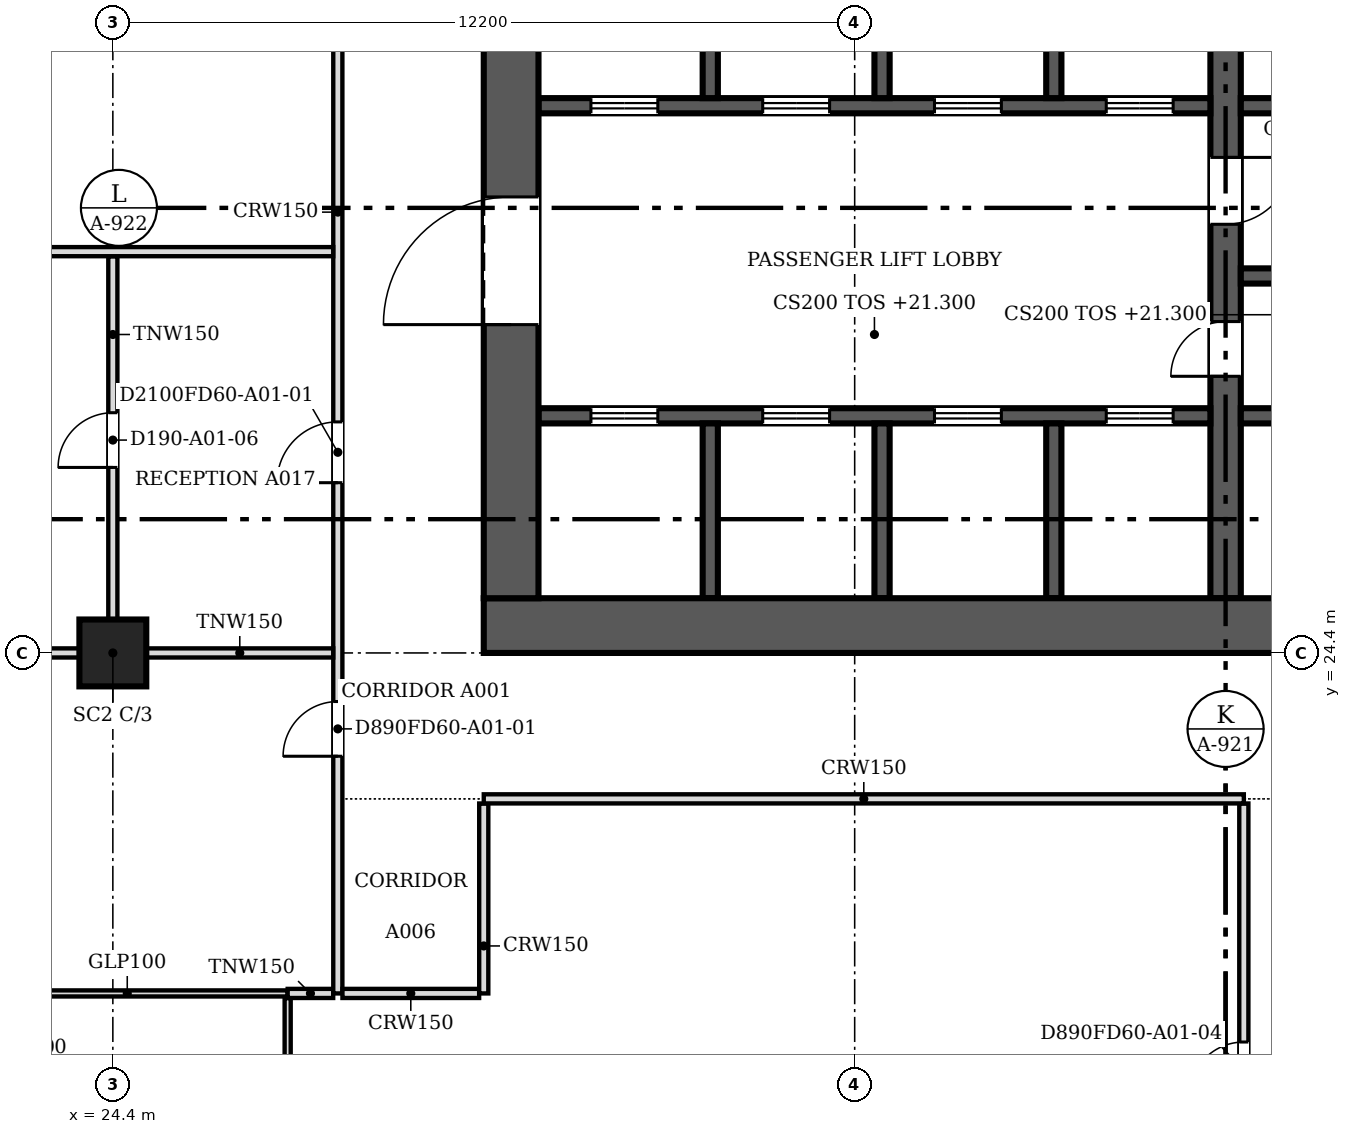
"""IFC4 building model, lengths in metres.
Left out: names, types, materials, properties, quantities, classifications, styles, units other than length and angle.
Written with IfcOpenShell. Run it as: python <this file> out.ifc"""

import sys

from ifc_helpers import new_model, si_unit, direction, frame, frame_2d, origin, origin_2d, place, context, subcontext, project, spatial, rectangle, extrude, source, transform, mapped, element, fill, save


model = new_model("IFC4")
c1 = context("Model", 3, precision=1e-05, world=origin(), true_north=direction((0.0, 1.0)))
c2 = subcontext(c1, "Body", "Model", "MODEL_VIEW")
j1 = project(units=[si_unit("LENGTHUNIT", "METRE"), si_unit("PLANEANGLEUNIT", "RADIAN")], contexts=[c1])
p1 = place(None, origin())
s1 = spatial("IfcSite", under=j1, at=p1, CompositionType="ELEMENT")
p2 = place(p1, origin())
s2 = spatial("IfcBuilding", under=s1, at=p2, CompositionType="ELEMENT")
p3 = place(p2, frame((0.0, 0.0, 21.3)))
s3 = spatial("IfcBuildingStorey", under=s2, at=p3, CompositionType="ELEMENT", Elevation=21.3)
p4 = place(p3, frame((24.4, 24.4, 0.0), z_axis=(0.0, 0.0, 1.0), x_axis=(1.0, 0.0, 0.0)))
e1 = element("IfcColumn", 1, at=p4, inside=s3, PredefinedType="COLUMN", context=c2, shape_type="SweptSolid", body=[
    extrude(rectangle(XDim=1.1, YDim=1.1, at=origin_2d()), origin(), (0.0, 0.0, 1.0), 4.3),
])
p5 = place(p3, frame((54.9, 24.85, 0.0), z_axis=(0.0, 0.0, 1.0), x_axis=(-1.0, 0.0, 0.0)))
e2 = element("IfcWall", 2, at=p5, inside=s3, PredefinedType="SHEAR", context=c2, shape_type="SweptSolid", body=[
    extrude(rectangle(XDim=24.4, YDim=0.9, at=frame_2d((12.2, 0.0))), origin(), (0.0, 0.0, 1.0), 4.5),
])
m1 = source(origin(), c2, "Body", "SweptSolid", [
    extrude(rectangle(XDim=1.2, YDim=2.1, at=frame_2d((0.6, 1.05))), frame((0.0, 0.46, 0.0), z_axis=(0.0, -1.0, 0.0), x_axis=(1.0, 0.0, 0.0)), (0.0, 0.0, 1.0), 0.92),
])
p6 = place(p5, frame((1.5, 0.0, 0.0)))
e3 = element("IfcOpeningElement", 3, at=p6, cuts=e2, PredefinedType="OPENING", context=c2, shape_type="MappedRepresentation", body=[
    mapped(m1, transform((0.0, 0.0, 0.0), scale=1.0)),
])
p7 = place(p3, frame((30.95, 25.3, 0.0), z_axis=(0.0, 0.0, 1.0), x_axis=(0.0, 1.0, 0.0)))
e4 = element("IfcWall", 4, at=p7, inside=s3, PredefinedType="SHEAR", context=c2, shape_type="SweptSolid", body=[
    extrude(rectangle(XDim=22.6, YDim=0.9, at=frame_2d((11.3, 0.0))), origin(), (0.0, 0.0, 1.0), 4.5),
])
m2 = source(origin(), c2, "Body", "SweptSolid", [
    extrude(rectangle(XDim=2.1, YDim=2.4, at=frame_2d((1.05, 1.2))), frame((0.0, 0.46, 0.0), z_axis=(0.0, -1.0, 0.0), x_axis=(1.0, 0.0, 0.0)), (0.0, 0.0, 1.0), 0.92),
])
p8 = place(p7, frame((4.5, 0.0, 0.0)))
e5 = element("IfcOpeningElement", 5, at=p8, cuts=e4, PredefinedType="OPENING", context=c2, shape_type="MappedRepresentation", body=[
    mapped(m2, transform((0.0, 0.0, 0.0), scale=1.0)),
])
p9 = place(p7, frame((16.0, 0.0, 0.0)))
e6 = element("IfcOpeningElement", 6, at=p9, cuts=e4, PredefinedType="OPENING", context=c2, shape_type="MappedRepresentation", body=[
    mapped(m2, transform((0.0, 0.0, 0.0), scale=1.0)),
])
p10 = place(p3, frame((42.7, 36.35, 0.0), z_axis=(0.0, 0.0, 1.0), x_axis=(0.0, -1.0, 0.0)))
e7 = element("IfcWall", 7, at=p10, inside=s3, PredefinedType="SHEAR", context=c2, shape_type="SweptSolid", body=[
    extrude(rectangle(XDim=11.05, YDim=0.5, at=frame_2d((5.525, 0.0))), origin(), (0.0, 0.0, 1.0), 4.5),
])
m3 = source(origin(), c2, "Body", "SweptSolid", [
    extrude(rectangle(XDim=0.9, YDim=2.1, at=frame_2d((0.45, 1.05))), frame((0.0, 0.26, 0.0), z_axis=(0.0, -1.0, 0.0), x_axis=(1.0, 0.0, 0.0)), (0.0, 0.0, 1.0), 0.52),
])
p11 = place(p10, frame((6.5, 0.0, 0.0)))
e8 = element("IfcOpeningElement", 8, at=p11, cuts=e7, PredefinedType="OPENING", context=c2, shape_type="MappedRepresentation", body=[
    mapped(m3, transform((0.0, 0.0, 0.0), scale=1.0)),
])
m4 = source(origin(), c2, "Body", "SweptSolid", [
    extrude(rectangle(XDim=1.1, YDim=2.1, at=frame_2d((0.55, 1.05))), frame((0.0, 0.26, 0.0), z_axis=(0.0, -1.0, 0.0), x_axis=(1.0, 0.0, 0.0)), (0.0, 0.0, 1.0), 0.52),
])
p12 = place(p10, frame((3.8, 0.0, 0.0)))
e9 = element("IfcOpeningElement", 9, at=p12, cuts=e7, PredefinedType="OPENING", context=c2, shape_type="MappedRepresentation", body=[
    mapped(m4, transform((0.0, 0.0, 0.0), scale=1.0)),
])
p13 = place(p3, frame((42.45, 33.4, 0.0), z_axis=(0.0, 0.0, 1.0), x_axis=(-1.0, 0.0, 0.0)))
e10 = element("IfcWall", 10, at=p13, inside=s3, PredefinedType="SOLIDWALL", context=c2, shape_type="SweptSolid", body=[
    extrude(rectangle(XDim=11.05, YDim=0.25, at=frame_2d((5.525, 0.0))), origin(), (0.0, 0.0, 1.0), 4.5),
])
m5 = source(origin(), c2, "Body", "SweptSolid", [
    extrude(rectangle(XDim=1.1, YDim=2.1, at=frame_2d((0.55, 1.05))), frame((0.0, 0.135, 0.0), z_axis=(0.0, -1.0, 0.0), x_axis=(1.0, 0.0, 0.0)), (0.0, 0.0, 1.0), 0.27),
])
p14 = place(p13, frame((9.087, 0.0, 0.0)))
e11 = element("IfcOpeningElement", 11, at=p14, cuts=e10, PredefinedType="OPENING", context=c2, shape_type="MappedRepresentation", body=[
    mapped(m5, transform((0.0, 0.0, 0.0), scale=1.0)),
])
p15 = place(p13, frame((6.262, 0.0, 0.0)))
e12 = element("IfcOpeningElement", 12, at=p15, cuts=e10, PredefinedType="OPENING", context=c2, shape_type="MappedRepresentation", body=[
    mapped(m5, transform((0.0, 0.0, 0.0), scale=1.0)),
])
p16 = place(p13, frame((3.438, 0.0, 0.0)))
e13 = element("IfcOpeningElement", 13, at=p16, cuts=e10, PredefinedType="OPENING", context=c2, shape_type="MappedRepresentation", body=[
    mapped(m5, transform((0.0, 0.0, 0.0), scale=1.0)),
])
p17 = place(p13, frame((0.613, 0.0, 0.0)))
e14 = element("IfcOpeningElement", 14, at=p17, cuts=e10, PredefinedType="OPENING", context=c2, shape_type="MappedRepresentation", body=[
    mapped(m5, transform((0.0, 0.0, 0.0), scale=1.0)),
])
p18 = place(p3, frame((48.225, 33.4, 0.0), z_axis=(0.0, 0.0, 1.0), x_axis=(-1.0, 0.0, 0.0)))
e15 = element("IfcWall", 15, at=p18, inside=s3, PredefinedType="SOLIDWALL", context=c2, shape_type="SweptSolid", body=[
    extrude(rectangle(XDim=5.275, YDim=0.25, at=frame_2d((2.638, 0.0))), origin(), (0.0, 0.0, 1.0), 4.5),
])
m6 = source(origin(), c2, "Body", "SweptSolid", [
    extrude(rectangle(XDim=1.2, YDim=2.1, at=frame_2d((0.6, 1.05))), frame((0.0, 0.135, 0.0), z_axis=(0.0, -1.0, 0.0), x_axis=(1.0, 0.0, 0.0)), (0.0, 0.0, 1.0), 0.27),
])
p19 = place(p18, frame((3.512, 0.0, 0.0)))
e16 = element("IfcOpeningElement", 16, at=p19, cuts=e15, PredefinedType="OPENING", context=c2, shape_type="MappedRepresentation", body=[
    mapped(m6, transform((0.0, 0.0, 0.0), scale=1.0)),
])
p20 = place(p18, frame((0.688, 0.0, 0.0)))
e17 = element("IfcOpeningElement", 17, at=p20, cuts=e15, PredefinedType="OPENING", context=c2, shape_type="MappedRepresentation", body=[
    mapped(m6, transform((0.0, 0.0, 0.0), scale=1.0)),
])
p21 = place(p3, frame((31.4, 28.3, 0.0), z_axis=(0.0, 0.0, 1.0), x_axis=(1.0, 0.0, 0.0)))
e18 = element("IfcWall", 18, at=p21, inside=s3, PredefinedType="SOLIDWALL", context=c2, shape_type="SweptSolid", body=[
    extrude(rectangle(XDim=11.05, YDim=0.25, at=frame_2d((5.525, 0.0))), origin(), (0.0, 0.0, 1.0), 4.5),
])
p22 = place(p21, frame((0.863, 0.0, 0.0)))
e19 = element("IfcOpeningElement", 19, at=p22, cuts=e18, PredefinedType="OPENING", context=c2, shape_type="MappedRepresentation", body=[
    mapped(m5, transform((0.0, 0.0, 0.0), scale=1.0)),
])
p23 = place(p21, frame((3.688, 0.0, 0.0)))
e20 = element("IfcOpeningElement", 20, at=p23, cuts=e18, PredefinedType="OPENING", context=c2, shape_type="MappedRepresentation", body=[
    mapped(m5, transform((0.0, 0.0, 0.0), scale=1.0)),
])
p24 = place(p21, frame((6.512, 0.0, 0.0)))
e21 = element("IfcOpeningElement", 21, at=p24, cuts=e18, PredefinedType="OPENING", context=c2, shape_type="MappedRepresentation", body=[
    mapped(m5, transform((0.0, 0.0, 0.0), scale=1.0)),
])
p25 = place(p21, frame((9.337, 0.0, 0.0)))
e22 = element("IfcOpeningElement", 22, at=p25, cuts=e18, PredefinedType="OPENING", context=c2, shape_type="MappedRepresentation", body=[
    mapped(m5, transform((0.0, 0.0, 0.0), scale=1.0)),
])
for number, where, z_axis, x_axis in (
    (23, (42.95, 28.3, 0.0), (0.0, 0.0, 1.0), (1.0, 0.0, 0.0)),
    (24, (42.95, 30.6, 0.0), (0.0, 0.0, 1.0), (1.0, 0.0, 0.0)),
):
    element("IfcWall", number, at=place(p3, frame(where, z_axis=z_axis, x_axis=x_axis)), inside=s3, PredefinedType="SOLIDWALL", context=c2, shape_type="SweptSolid", body=[
        extrude(rectangle(XDim=5.275, YDim=0.25, at=frame_2d((2.638, 0.0))), origin(), (0.0, 0.0, 1.0), 4.5),
    ])
for number, where, z_axis, x_axis in (
    (25, (34.225, 33.525, 0.0), (0.0, 0.0, 1.0), (0.0, 1.0, 0.0)),
    (26, (37.05, 33.525, 0.0), (0.0, 0.0, 1.0), (0.0, 1.0, 0.0)),
    (27, (39.875, 33.525, 0.0), (0.0, 0.0, 1.0), (0.0, 1.0, 0.0)),
):
    element("IfcWall", number, at=place(p3, frame(where, z_axis=z_axis, x_axis=x_axis)), inside=s3, PredefinedType="SOLIDWALL", context=c2, shape_type="SweptSolid", body=[
        extrude(rectangle(XDim=2.825, YDim=0.25, at=frame_2d((1.413, 0.0))), origin(), (0.0, 0.0, 1.0), 4.5),
    ])
for number, where, z_axis, x_axis in (
    (28, (34.225, 25.3, 0.0), (0.0, 0.0, 1.0), (0.0, 1.0, 0.0)),
    (29, (37.05, 25.3, 0.0), (0.0, 0.0, 1.0), (0.0, 1.0, 0.0)),
    (30, (39.875, 25.3, 0.0), (0.0, 0.0, 1.0), (0.0, 1.0, 0.0)),
):
    element("IfcWall", number, at=place(p3, frame(where, z_axis=z_axis, x_axis=x_axis)), inside=s3, PredefinedType="SOLIDWALL", context=c2, shape_type="SweptSolid", body=[
        extrude(rectangle(XDim=2.875, YDim=0.25, at=frame_2d((1.438, 0.0))), origin(), (0.0, 0.0, 1.0), 4.5),
    ])
p26 = place(p3, frame((43.0, 0.5, 0.0), z_axis=(0.0, 0.0, 1.0), x_axis=(0.0, 1.0, 0.0)))
e31 = element("IfcWall", 31, at=p26, inside=s3, PredefinedType="PARTITIONING", context=c2, shape_type="SweptSolid", body=[
    extrude(rectangle(XDim=21.424, YDim=0.15, at=frame_2d((10.712, 0.0))), origin(), (0.0, 0.0, 1.0), 3.767),
])
m7 = source(origin(), c2, "Body", "SweptSolid", [
    extrude(rectangle(XDim=0.9, YDim=2.1, at=frame_2d((0.45, 1.05))), frame((0.0, 0.085, 0.0), z_axis=(0.0, -1.0, 0.0), x_axis=(1.0, 0.0, 0.0)), (0.0, 0.0, 1.0), 0.17),
])
p27 = place(p26, frame((16.601, 0.0, 0.0)))
e32 = element("IfcOpeningElement", 32, at=p27, cuts=e31, PredefinedType="OPENING", context=c2, shape_type="MappedRepresentation", body=[
    mapped(m7, transform((0.0, 0.0, 0.0), scale=1.0)),
])
m8 = source(origin(), c2, "Body", "SweptSolid", [
    extrude(rectangle(XDim=1.0, YDim=2.1, at=frame_2d((0.5, 1.05))), frame((0.0, 0.085, 0.0), z_axis=(0.0, -1.0, 0.0), x_axis=(1.0, 0.0, 0.0)), (0.0, 0.0, 1.0), 0.17),
])
p28 = place(p26, frame((7.7, 0.0, 0.0)))
e33 = element("IfcOpeningElement", 33, at=p28, cuts=e31, PredefinedType="OPENING", context=c2, shape_type="MappedRepresentation", body=[
    mapped(m8, transform((0.0, 0.0, 0.0), scale=1.0)),
])
p29 = place(p3, frame((27.275, 13.276, 0.0), z_axis=(0.0, 0.0, 1.0), x_axis=(0.0, 1.0, 0.0)))
e34 = element("IfcWall", 34, at=p29, inside=s3, PredefinedType="PARTITIONING", context=c2, shape_type="SweptSolid", body=[
    extrude(rectangle(XDim=5.448, YDim=0.1, at=frame_2d((2.724, 0.0))), origin(), (0.0, 0.0, 1.0), 3.767),
])
m9 = source(origin(), c2, "Body", "SweptSolid", [
    extrude(rectangle(XDim=0.9, YDim=2.1, at=frame_2d((0.45, 1.05))), frame((0.0, 0.06, 0.0), z_axis=(0.0, -1.0, 0.0), x_axis=(1.0, 0.0, 0.0)), (0.0, 0.0, 1.0), 0.12),
])
p30 = place(p29, frame((2.3, 0.0, 0.0)))
e35 = element("IfcOpeningElement", 35, at=p30, cuts=e34, PredefinedType="OPENING", context=c2, shape_type="MappedRepresentation", body=[
    mapped(m9, transform((0.0, 0.0, 0.0), scale=1.0)),
])
p31 = place(p3, frame((22.0, 18.8, 0.0), z_axis=(0.0, 0.0, 1.0), x_axis=(1.0, 0.0, 0.0)))
e36 = element("IfcWall", 36, at=p31, inside=s3, PredefinedType="PARTITIONING", context=c2, shape_type="SweptSolid", body=[
    extrude(rectangle(XDim=5.274, YDim=0.1, at=frame_2d((2.637, 0.0))), origin(), (0.0, 0.0, 1.0), 3.767),
])
p32 = place(p3, frame((27.275, 18.8, 0.0), z_axis=(0.0, 0.0, 1.0), x_axis=(1.0, 0.0, 0.0)))
e37 = element("IfcWall", 37, at=p32, inside=s3, PredefinedType="PARTITIONING", context=c2, shape_type="SweptSolid", body=[
    extrude(rectangle(XDim=0.749, YDim=0.15, at=frame_2d((0.375, 0.0))), origin(), (0.0, 0.0, 1.0), 3.767),
])
p33 = place(p3, frame((28.1, 18.8, 0.0), z_axis=(0.0, 0.0, 1.0), x_axis=(0.0, 1.0, 0.0)))
e38 = element("IfcWall", 38, at=p33, inside=s3, PredefinedType="PARTITIONING", context=c2, shape_type="SweptSolid", body=[
    extrude(rectangle(XDim=26.424, YDim=0.15, at=frame_2d((13.212, 0.0))), origin(), (0.0, 0.0, 1.0), 3.767),
])
p34 = place(p33, frame((3.901, 0.0, 0.0)))
e39 = element("IfcOpeningElement", 39, at=p34, cuts=e38, PredefinedType="OPENING", context=c2, shape_type="MappedRepresentation", body=[
    mapped(m7, transform((0.0, 0.0, 0.0), scale=1.0)),
])
p35 = place(p33, frame((23.451, 0.0, 0.0)))
e40 = element("IfcOpeningElement", 40, at=p35, cuts=e38, PredefinedType="OPENING", context=c2, shape_type="MappedRepresentation", body=[
    mapped(m7, transform((0.0, 0.0, 0.0), scale=1.0)),
])
p36 = place(p33, frame((8.4, 0.0, 0.0)))
e41 = element("IfcOpeningElement", 41, at=p36, cuts=e38, PredefinedType="OPENING", context=c2, shape_type="MappedRepresentation", body=[
    mapped(m8, transform((0.0, 0.0, 0.0), scale=1.0)),
])
p37 = place(p33, frame((16.3, 0.0, 0.0)))
e42 = element("IfcOpeningElement", 42, at=p37, cuts=e38, PredefinedType="OPENING", context=c2, shape_type="MappedRepresentation", body=[
    mapped(m7, transform((0.0, 0.0, 0.0), scale=1.0)),
])
p38 = place(p3, frame((28.176, 18.8, 0.0), z_axis=(0.0, 0.0, 1.0), x_axis=(1.0, 0.0, 0.0)))
e43 = element("IfcWall", 43, at=p38, inside=s3, PredefinedType="PARTITIONING", context=c2, shape_type="SweptSolid", body=[
    extrude(rectangle(XDim=2.248, YDim=0.15, at=frame_2d((1.124, 0.0))), origin(), (0.0, 0.0, 1.0), 3.767),
])
p39 = place(p3, frame((30.5, 18.8, 0.0), z_axis=(0.0, 0.0, 1.0), x_axis=(0.0, 1.0, 0.0)))
e44 = element("IfcWall", 44, at=p39, inside=s3, PredefinedType="PARTITIONING", context=c2, shape_type="SweptSolid", body=[
    extrude(rectangle(XDim=3.124, YDim=0.15, at=frame_2d((1.562, 0.0))), origin(), (0.0, 0.0, 1.0), 3.767),
])
p40 = place(p3, frame((30.5, 22.0, 0.0), z_axis=(0.0, 0.0, 1.0), x_axis=(1.0, 0.0, 0.0)))
e45 = element("IfcWall", 45, at=p40, inside=s3, PredefinedType="PARTITIONING", context=c2, shape_type="SweptSolid", body=[
    extrude(rectangle(XDim=12.5, YDim=0.15, at=frame_2d((6.25, 0.0))), origin(), (0.0, 0.0, 1.0), 3.767),
])
p41 = place(p3, frame((12.751, 24.4, 0.0), z_axis=(0.0, 0.0, 1.0), x_axis=(1.0, 0.0, 0.0)))
e46 = element("IfcWall", 46, at=p41, inside=s3, PredefinedType="PARTITIONING", context=c2, shape_type="SweptSolid", body=[
    extrude(rectangle(XDim=11.098, YDim=0.15, at=frame_2d((5.549, 0.0))), origin(), (0.0, 0.0, 1.0), 3.767),
])
p42 = place(p3, frame((24.951, 24.4, 0.0), z_axis=(0.0, 0.0, 1.0), x_axis=(1.0, 0.0, 0.0)))
e47 = element("IfcWall", 47, at=p42, inside=s3, PredefinedType="PARTITIONING", context=c2, shape_type="SweptSolid", body=[
    extrude(rectangle(XDim=3.073, YDim=0.15, at=frame_2d((1.537, 0.0))), origin(), (0.0, 0.0, 1.0), 3.767),
])
p43 = place(p3, frame((24.4, 24.951, 0.0), z_axis=(0.0, 0.0, 1.0), x_axis=(0.0, 1.0, 0.0)))
e48 = element("IfcWall", 48, at=p43, inside=s3, PredefinedType="PARTITIONING", context=c2, shape_type="SweptSolid", body=[
    extrude(rectangle(XDim=5.973, YDim=0.15, at=frame_2d((2.987, 0.0))), origin(), (0.0, 0.0, 1.0), 3.767),
])
p44 = place(p43, frame((2.5, 0.0, 0.0)))
e49 = element("IfcOpeningElement", 49, at=p44, cuts=e48, PredefinedType="OPENING", context=c2, shape_type="MappedRepresentation", body=[
    mapped(m7, transform((0.0, 0.0, 0.0), scale=1.0)),
])
p45 = place(p3, frame((5.425, 31.0, 0.0), z_axis=(0.0, 0.0, 1.0), x_axis=(1.0, 0.0, 0.0)))
e50 = element("IfcWall", 50, at=p45, inside=s3, PredefinedType="PARTITIONING", context=c2, shape_type="SweptSolid", body=[
    extrude(rectangle(XDim=22.599, YDim=0.15, at=frame_2d((11.299, 0.0))), origin(), (0.0, 0.0, 1.0), 3.767),
])
m10 = source(origin(), c2, "Body", "SweptSolid", [
    extrude(rectangle(XDim=2.1, YDim=2.4, at=frame_2d((1.05, 1.2))), frame((0.0, 0.025, 0.0), z_axis=(0.0, -1.0, 0.0), x_axis=(1.0, 0.0, 0.0)), (0.0, 0.0, 1.0), 0.05),
])
p46 = place(p8, origin())
e51 = element("IfcDoor", 51, at=p46, inside=s3, OperationType="DOUBLE_DOOR_SINGLE_SWING", PredefinedType="DOOR", context=c2, shape_type="MappedRepresentation", body=[
    mapped(m10, transform((0.0, 0.0, 0.0), scale=1.0)),
])
fill(e5, e51)
m11 = source(origin(), c2, "Body", "SweptSolid", [
    extrude(rectangle(XDim=0.9, YDim=2.1, at=frame_2d((0.45, 1.05))), frame((0.0, 0.025, 0.0), z_axis=(0.0, -1.0, 0.0), x_axis=(1.0, 0.0, 0.0)), (0.0, 0.0, 1.0), 0.05),
])
p47 = place(p11, origin())
e52 = element("IfcDoor", 52, at=p47, inside=s3, OperationType="SINGLE_SWING_RIGHT", PredefinedType="DOOR", context=c2, shape_type="MappedRepresentation", body=[
    mapped(m11, transform((0.0, 0.0, 0.0), scale=1.0)),
])
fill(e8, e52)
m12 = source(origin(), c2, "Body", "SweptSolid", [
    extrude(rectangle(XDim=1.1, YDim=2.1, at=frame_2d((0.55, 1.05))), frame((0.0, 0.025, 0.0), z_axis=(0.0, -1.0, 0.0), x_axis=(1.0, 0.0, 0.0)), (0.0, 0.0, 1.0), 0.05),
])
p48 = place(p12, origin())
e53 = element("IfcDoor", 53, at=p48, inside=s3, OperationType="SINGLE_SWING_LEFT", PredefinedType="DOOR", context=c2, shape_type="MappedRepresentation", body=[
    mapped(m12, transform((0.0, 0.0, 0.0), scale=1.0)),
])
fill(e9, e53)
p49 = place(p14, origin())
e54 = element("IfcDoor", 54, at=p49, inside=s3, OperationType="DOUBLE_DOOR_SLIDING", PredefinedType="DOOR", context=c2, shape_type="MappedRepresentation", body=[
    mapped(m12, transform((0.0, 0.0, 0.0), scale=1.0)),
])
fill(e11, e54)
p50 = place(p15, origin())
e55 = element("IfcDoor", 55, at=p50, inside=s3, OperationType="DOUBLE_DOOR_SLIDING", PredefinedType="DOOR", context=c2, shape_type="MappedRepresentation", body=[
    mapped(m12, transform((0.0, 0.0, 0.0), scale=1.0)),
])
fill(e12, e55)
p51 = place(p16, origin())
e56 = element("IfcDoor", 56, at=p51, inside=s3, OperationType="DOUBLE_DOOR_SLIDING", PredefinedType="DOOR", context=c2, shape_type="MappedRepresentation", body=[
    mapped(m12, transform((0.0, 0.0, 0.0), scale=1.0)),
])
fill(e13, e56)
p52 = place(p17, origin())
e57 = element("IfcDoor", 57, at=p52, inside=s3, OperationType="DOUBLE_DOOR_SLIDING", PredefinedType="DOOR", context=c2, shape_type="MappedRepresentation", body=[
    mapped(m12, transform((0.0, 0.0, 0.0), scale=1.0)),
])
fill(e14, e57)
p53 = place(p22, origin())
e58 = element("IfcDoor", 58, at=p53, inside=s3, OperationType="DOUBLE_DOOR_SLIDING", PredefinedType="DOOR", context=c2, shape_type="MappedRepresentation", body=[
    mapped(m12, transform((0.0, 0.0, 0.0), scale=1.0)),
])
fill(e19, e58)
p54 = place(p23, origin())
e59 = element("IfcDoor", 59, at=p54, inside=s3, OperationType="DOUBLE_DOOR_SLIDING", PredefinedType="DOOR", context=c2, shape_type="MappedRepresentation", body=[
    mapped(m12, transform((0.0, 0.0, 0.0), scale=1.0)),
])
fill(e20, e59)
p55 = place(p24, origin())
e60 = element("IfcDoor", 60, at=p55, inside=s3, OperationType="DOUBLE_DOOR_SLIDING", PredefinedType="DOOR", context=c2, shape_type="MappedRepresentation", body=[
    mapped(m12, transform((0.0, 0.0, 0.0), scale=1.0)),
])
fill(e21, e60)
p56 = place(p25, origin())
e61 = element("IfcDoor", 61, at=p56, inside=s3, OperationType="DOUBLE_DOOR_SLIDING", PredefinedType="DOOR", context=c2, shape_type="MappedRepresentation", body=[
    mapped(m12, transform((0.0, 0.0, 0.0), scale=1.0)),
])
fill(e22, e61)
p57 = place(p34, origin())
e62 = element("IfcDoor", 62, at=p57, inside=s3, OperationType="SINGLE_SWING_LEFT", PredefinedType="DOOR", context=c2, shape_type="MappedRepresentation", body=[
    mapped(m11, transform((0.0, 0.0, 0.0), scale=1.0)),
])
fill(e39, e62)
p58 = place(p44, origin())
e63 = element("IfcDoor", 63, at=p58, inside=s3, OperationType="SINGLE_SWING_LEFT", PredefinedType="DOOR", context=c2, shape_type="MappedRepresentation", body=[
    mapped(m11, transform((0.0, 0.0, 0.0), scale=1.0)),
])
fill(e49, e63)
m13 = source(origin(), c2, "Body", "SweptSolid", [
    extrude(rectangle(XDim=1.0, YDim=2.1, at=frame_2d((0.5, 1.05))), frame((0.0, 0.025, 0.0), z_axis=(0.0, -1.0, 0.0), x_axis=(1.0, 0.0, 0.0)), (0.0, 0.0, 1.0), 0.05),
])
p59 = place(p36, origin())
e64 = element("IfcDoor", 64, at=p59, inside=s3, OperationType="SINGLE_SWING_LEFT", PredefinedType="DOOR", context=c2, shape_type="MappedRepresentation", body=[
    mapped(m13, transform((0.0, 0.0, 0.0), scale=1.0)),
])
fill(e41, e64)
p60 = place(p27, origin())
e65 = element("IfcDoor", 65, at=p60, inside=s3, OperationType="SINGLE_SWING_LEFT", PredefinedType="DOOR", context=c2, shape_type="MappedRepresentation", body=[
    mapped(m11, transform((0.0, 0.0, 0.0), scale=1.0)),
])
fill(e32, e65)
save(model, sys.argv[1])
